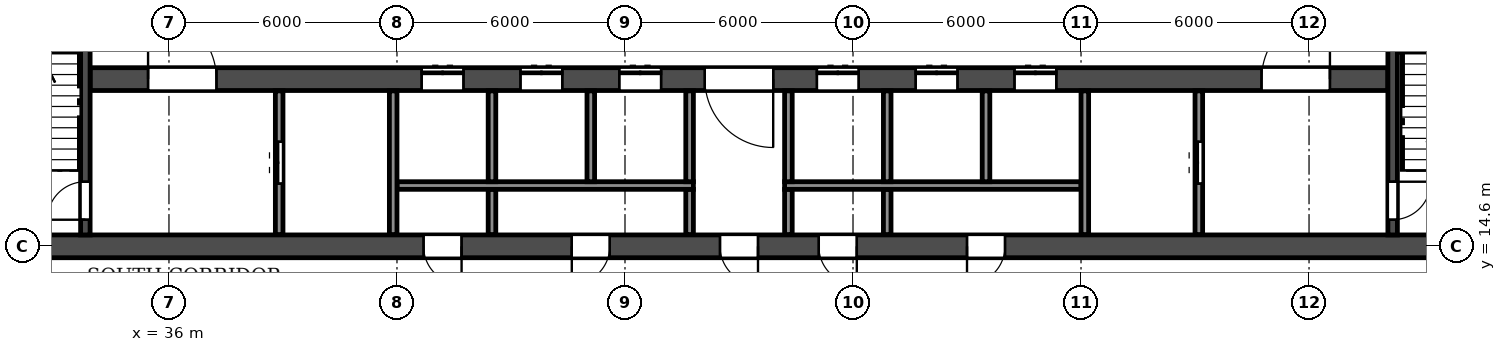
"""IFC4 building model, lengths in metres.
Left out: names, types, materials, properties, quantities, classifications, styles, units other than length and angle.
Written with IfcOpenShell. Run it as: python <this file> out.ifc"""

import sys

from ifc_helpers import new_model, si_unit, direction, frame, frame_2d, origin, place, context, subcontext, project, spatial, rectangle, extrude, element, fill, save


model = new_model("IFC4")
c1 = context("Model", 3, precision=1e-05, world=origin(), true_north=direction((0.0, 1.0)))
c2 = subcontext(c1, "Body", "Model", "MODEL_VIEW")
j1 = project(units=[si_unit("LENGTHUNIT", "METRE"), si_unit("PLANEANGLEUNIT", "RADIAN")], contexts=[c1])
p1 = place(None, origin())
s1 = spatial("IfcSite", under=j1, at=p1, CompositionType="ELEMENT")
p2 = place(p1, origin())
s2 = spatial("IfcBuilding", under=s1, at=p2, CompositionType="ELEMENT")
p3 = place(p2, frame((0.0, 0.0, 66.3)))
s3 = spatial("IfcBuildingStorey", under=s2, at=p3, CompositionType="ELEMENT", Elevation=66.3)
p4 = place(p3, frame((29.7, 14.6, 0.0), z_axis=(0.0, 0.0, 1.0), x_axis=(1.0, 0.0, 0.0)))
e1 = element("IfcWall", 1, at=p4, inside=s3, PredefinedType="SOLIDWALL", context=c2, shape_type="SweptSolid", body=[
    extrude(rectangle(XDim=42.6, YDim=0.6, at=frame_2d((21.3, 0.0))), origin(), (0.0, 0.0, 1.0), 6.36),
])
p5 = place(p4, frame((1.7, 0.0, 0.0)))
e2 = element("IfcOpeningElement", 2, at=p5, cuts=e1, PredefinedType="OPENING", context=c2, shape_type="SweptSolid", body=[
    extrude(rectangle(XDim=1.0, YDim=2.1, at=frame_2d((0.5, 1.05))), frame((0.0, 0.31, 0.0), z_axis=(0.0, -1.0, 0.0), x_axis=(1.0, 0.0, 0.0)), (0.0, 0.0, 1.0), 0.62),
])
p6 = place(p4, frame((13.0, 0.0, 0.0)))
e3 = element("IfcOpeningElement", 3, at=p6, cuts=e1, PredefinedType="OPENING", context=c2, shape_type="SweptSolid", body=[
    extrude(rectangle(XDim=1.0, YDim=2.1, at=frame_2d((0.5, 1.05))), frame((0.0, 0.31, 0.0), z_axis=(0.0, -1.0, 0.0), x_axis=(1.0, 0.0, 0.0)), (0.0, 0.0, 1.0), 0.62),
])
p7 = place(p4, frame((16.9, 0.0, 0.0)))
e4 = element("IfcOpeningElement", 4, at=p7, cuts=e1, PredefinedType="OPENING", context=c2, shape_type="SweptSolid", body=[
    extrude(rectangle(XDim=1.0, YDim=2.1, at=frame_2d((0.5, 1.05))), frame((0.0, 0.31, 0.0), z_axis=(0.0, -1.0, 0.0), x_axis=(1.0, 0.0, 0.0)), (0.0, 0.0, 1.0), 0.62),
])
p8 = place(p4, frame((20.8, 0.0, 0.0)))
e5 = element("IfcOpeningElement", 5, at=p8, cuts=e1, PredefinedType="OPENING", context=c2, shape_type="SweptSolid", body=[
    extrude(rectangle(XDim=1.0, YDim=2.1, at=frame_2d((0.5, 1.05))), frame((0.0, 0.31, 0.0), z_axis=(0.0, -1.0, 0.0), x_axis=(1.0, 0.0, 0.0)), (0.0, 0.0, 1.0), 0.62),
])
p9 = place(p4, frame((23.4, 0.0, 0.0)))
e6 = element("IfcOpeningElement", 6, at=p9, cuts=e1, PredefinedType="OPENING", context=c2, shape_type="SweptSolid", body=[
    extrude(rectangle(XDim=1.0, YDim=2.1, at=frame_2d((0.5, 1.05))), frame((0.0, 0.31, 0.0), z_axis=(0.0, -1.0, 0.0), x_axis=(1.0, 0.0, 0.0)), (0.0, 0.0, 1.0), 0.62),
])
p10 = place(p4, frame((27.3, 0.0, 0.0)))
e7 = element("IfcOpeningElement", 7, at=p10, cuts=e1, PredefinedType="OPENING", context=c2, shape_type="SweptSolid", body=[
    extrude(rectangle(XDim=1.0, YDim=2.1, at=frame_2d((0.5, 1.05))), frame((0.0, 0.31, 0.0), z_axis=(0.0, -1.0, 0.0), x_axis=(1.0, 0.0, 0.0)), (0.0, 0.0, 1.0), 0.62),
])
p11 = place(p4, frame((39.9, 0.0, 0.0)))
e8 = element("IfcOpeningElement", 8, at=p11, cuts=e1, PredefinedType="OPENING", context=c2, shape_type="SweptSolid", body=[
    extrude(rectangle(XDim=1.0, YDim=2.1, at=frame_2d((0.5, 1.05))), frame((0.0, 0.31, 0.0), z_axis=(0.0, -1.0, 0.0), x_axis=(1.0, 0.0, 0.0)), (0.0, 0.0, 1.0), 0.62),
])
p12 = place(p3, frame((33.925, 19.0, 0.0), z_axis=(0.0, 0.0, 1.0), x_axis=(1.0, 0.0, 0.0)))
e9 = element("IfcWall", 9, at=p12, inside=s3, PredefinedType="SOLIDWALL", context=c2, shape_type="SweptSolid", body=[
    extrude(rectangle(XDim=34.15, YDim=0.6, at=frame_2d((17.075, 0.0))), origin(), (0.0, 0.0, 1.0), 6.36),
])
p13 = place(p12, frame((16.175, 0.0, 0.0)))
e10 = element("IfcOpeningElement", 10, at=p13, cuts=e9, PredefinedType="OPENING", context=c2, shape_type="SweptSolid", body=[
    extrude(rectangle(XDim=1.8, YDim=2.1, at=frame_2d((0.9, 1.05))), frame((0.0, 0.31, 0.0), z_axis=(0.0, -1.0, 0.0), x_axis=(1.0, 0.0, 0.0)), (0.0, 0.0, 1.0), 0.62),
])
p14 = place(p12, frame((1.525, 0.0, 0.0)))
e11 = element("IfcOpeningElement", 11, at=p14, cuts=e9, PredefinedType="OPENING", context=c2, shape_type="SweptSolid", body=[
    extrude(rectangle(XDim=1.8, YDim=2.1, at=frame_2d((0.9, 1.05))), frame((0.0, 0.31, 0.0), z_axis=(0.0, -1.0, 0.0), x_axis=(1.0, 0.0, 0.0)), (0.0, 0.0, 1.0), 0.62),
])
p15 = place(p12, frame((8.725, 0.0, 0.0)))
e12 = element("IfcOpeningElement", 12, at=p15, cuts=e9, PredefinedType="OPENING", context=c2, shape_type="SweptSolid", body=[
    extrude(rectangle(XDim=1.1, YDim=2.1, at=frame_2d((0.55, 1.05))), frame((0.0, 0.31, 0.0), z_axis=(0.0, -1.0, 0.0), x_axis=(1.0, 0.0, 0.0)), (0.0, 0.0, 1.0), 0.62),
])
p16 = place(p12, frame((11.325, 0.0, 0.0)))
e13 = element("IfcOpeningElement", 13, at=p16, cuts=e9, PredefinedType="OPENING", context=c2, shape_type="SweptSolid", body=[
    extrude(rectangle(XDim=1.1, YDim=2.1, at=frame_2d((0.55, 1.05))), frame((0.0, 0.31, 0.0), z_axis=(0.0, -1.0, 0.0), x_axis=(1.0, 0.0, 0.0)), (0.0, 0.0, 1.0), 0.62),
])
p17 = place(p12, frame((13.925, 0.0, 0.0)))
e14 = element("IfcOpeningElement", 14, at=p17, cuts=e9, PredefinedType="OPENING", context=c2, shape_type="SweptSolid", body=[
    extrude(rectangle(XDim=1.1, YDim=2.1, at=frame_2d((0.55, 1.05))), frame((0.0, 0.31, 0.0), z_axis=(0.0, -1.0, 0.0), x_axis=(1.0, 0.0, 0.0)), (0.0, 0.0, 1.0), 0.62),
])
p18 = place(p12, frame((19.125, 0.0, 0.0)))
e15 = element("IfcOpeningElement", 15, at=p18, cuts=e9, PredefinedType="OPENING", context=c2, shape_type="SweptSolid", body=[
    extrude(rectangle(XDim=1.1, YDim=2.1, at=frame_2d((0.55, 1.05))), frame((0.0, 0.31, 0.0), z_axis=(0.0, -1.0, 0.0), x_axis=(1.0, 0.0, 0.0)), (0.0, 0.0, 1.0), 0.62),
])
p19 = place(p12, frame((21.725, 0.0, 0.0)))
e16 = element("IfcOpeningElement", 16, at=p19, cuts=e9, PredefinedType="OPENING", context=c2, shape_type="SweptSolid", body=[
    extrude(rectangle(XDim=1.1, YDim=2.1, at=frame_2d((0.55, 1.05))), frame((0.0, 0.31, 0.0), z_axis=(0.0, -1.0, 0.0), x_axis=(1.0, 0.0, 0.0)), (0.0, 0.0, 1.0), 0.62),
])
p20 = place(p12, frame((24.325, 0.0, 0.0)))
e17 = element("IfcOpeningElement", 17, at=p20, cuts=e9, PredefinedType="OPENING", context=c2, shape_type="SweptSolid", body=[
    extrude(rectangle(XDim=1.1, YDim=2.1, at=frame_2d((0.55, 1.05))), frame((0.0, 0.31, 0.0), z_axis=(0.0, -1.0, 0.0), x_axis=(1.0, 0.0, 0.0)), (0.0, 0.0, 1.0), 0.62),
])
p21 = place(p12, frame((30.825, 0.0, 0.0)))
e18 = element("IfcOpeningElement", 18, at=p21, cuts=e9, PredefinedType="OPENING", context=c2, shape_type="SweptSolid", body=[
    extrude(rectangle(XDim=1.8, YDim=2.1, at=frame_2d((0.9, 1.05))), frame((0.0, 0.31, 0.0), z_axis=(0.0, -1.0, 0.0), x_axis=(1.0, 0.0, 0.0)), (0.0, 0.0, 1.0), 0.62),
])
p22 = place(p3, frame((33.8, 14.9, 0.0), z_axis=(0.0, 0.0, 1.0), x_axis=(0.0, 1.0, 0.0)))
e19 = element("IfcWall", 19, at=p22, inside=s3, PredefinedType="SOLIDWALL", context=c2, shape_type="SweptSolid", body=[
    extrude(rectangle(XDim=7.575, YDim=0.25, at=frame_2d((3.788, 0.0))), origin(), (0.0, 0.0, 1.0), 6.36),
])
p23 = place(p22, frame((0.4, 0.0, 0.0)))
e20 = element("IfcOpeningElement", 20, at=p23, cuts=e19, PredefinedType="OPENING", context=c2, shape_type="SweptSolid", body=[
    extrude(rectangle(XDim=1.0, YDim=2.1, at=frame_2d((0.5, 1.05))), frame((0.0, 0.135, 0.0), z_axis=(0.0, -1.0, 0.0), x_axis=(1.0, 0.0, 0.0)), (0.0, 0.0, 1.0), 0.27),
])
p24 = place(p3, frame((68.2, 14.9, 0.0), z_axis=(0.0, 0.0, 1.0), x_axis=(0.0, 1.0, 0.0)))
e21 = element("IfcWall", 21, at=p24, inside=s3, PredefinedType="SOLIDWALL", context=c2, shape_type="SweptSolid", body=[
    extrude(rectangle(XDim=7.575, YDim=0.25, at=frame_2d((3.788, 0.0))), origin(), (0.0, 0.0, 1.0), 6.36),
])
p25 = place(p24, frame((0.4, 0.0, 0.0)))
e22 = element("IfcOpeningElement", 22, at=p25, cuts=e21, PredefinedType="OPENING", context=c2, shape_type="SweptSolid", body=[
    extrude(rectangle(XDim=1.0, YDim=2.1, at=frame_2d((0.5, 1.05))), frame((0.0, 0.135, 0.0), z_axis=(0.0, -1.0, 0.0), x_axis=(1.0, 0.0, 0.0)), (0.0, 0.0, 1.0), 0.27),
])
for number, where, z_axis, x_axis in (
    (23, (44.5, 14.91, 0.0), (0.0, 0.0, 1.0), (0.0, 1.0, 0.0)),
    (24, (49.7, 14.91, 0.0), (0.0, 0.0, 1.0), (0.0, 1.0, 0.0)),
    (25, (52.3, 14.91, 0.0), (0.0, 0.0, 1.0), (0.0, 1.0, 0.0)),
    (26, (54.9, 14.91, 0.0), (0.0, 0.0, 1.0), (0.0, 1.0, 0.0)),
):
    element("IfcWall", number, at=place(p3, frame(where, z_axis=z_axis, x_axis=x_axis)), inside=s3, PredefinedType="PARTITIONING", context=c2, shape_type="SweptSolid", body=[
        extrude(rectangle(XDim=1.19, YDim=0.2, at=frame_2d((0.595, 0.0))), origin(), (0.0, 0.0, 1.0), 6.36),
    ])
for number, where, z_axis, x_axis in (
    (27, (42.0, 16.2, 0.0), (0.0, 0.0, 1.0), (1.0, 0.0, 0.0)),
    (28, (52.2, 16.2, 0.0), (0.0, 0.0, 1.0), (1.0, 0.0, 0.0)),
):
    element("IfcWall", number, at=place(p3, frame(where, z_axis=z_axis, x_axis=x_axis)), inside=s3, PredefinedType="PARTITIONING", context=c2, shape_type="SweptSolid", body=[
        extrude(rectangle(XDim=7.8, YDim=0.2, at=frame_2d((3.9, 0.0))), origin(), (0.0, 0.0, 1.0), 6.36),
    ])
p26 = place(p3, frame((38.9, 14.91, 0.0), z_axis=(0.0, 0.0, 1.0), x_axis=(0.0, 1.0, 0.0)))
e29 = element("IfcWall", 29, at=p26, inside=s3, PredefinedType="PARTITIONING", context=c2, shape_type="SweptSolid", body=[
    extrude(rectangle(XDim=3.78, YDim=0.2, at=frame_2d((1.89, 0.0))), origin(), (0.0, 0.0, 1.0), 6.36),
])
p27 = place(p26, frame((1.34, 0.0, 0.0)))
e30 = element("IfcOpeningElement", 30, at=p27, cuts=e29, PredefinedType="OPENING", context=c2, shape_type="SweptSolid", body=[
    extrude(rectangle(XDim=1.1, YDim=2.1, at=frame_2d((0.55, 1.05))), frame((0.0, 0.11, 0.0), z_axis=(0.0, -1.0, 0.0), x_axis=(1.0, 0.0, 0.0)), (0.0, 0.0, 1.0), 0.22),
])
p28 = place(p3, frame((41.9, 14.91, 0.0), z_axis=(0.0, 0.0, 1.0), x_axis=(0.0, 1.0, 0.0)))
e31 = element("IfcWall", 31, at=p28, inside=s3, PredefinedType="PARTITIONING", context=c2, shape_type="SweptSolid", body=[
    extrude(rectangle(XDim=3.78, YDim=0.2, at=frame_2d((1.89, 0.0))), origin(), (0.0, 0.0, 1.0), 6.36),
])
for number, where, z_axis, x_axis in (
    (32, (44.5, 16.3, 0.0), (0.0, 0.0, 1.0), (0.0, 1.0, 0.0)),
    (33, (47.1, 16.3, 0.0), (0.0, 0.0, 1.0), (0.0, 1.0, 0.0)),
    (34, (49.7, 16.3, 0.0), (0.0, 0.0, 1.0), (0.0, 1.0, 0.0)),
    (35, (52.3, 16.3, 0.0), (0.0, 0.0, 1.0), (0.0, 1.0, 0.0)),
    (36, (54.9, 16.3, 0.0), (0.0, 0.0, 1.0), (0.0, 1.0, 0.0)),
    (37, (57.5, 16.3, 0.0), (0.0, 0.0, 1.0), (0.0, 1.0, 0.0)),
):
    element("IfcWall", number, at=place(p3, frame(where, z_axis=z_axis, x_axis=x_axis)), inside=s3, PredefinedType="PARTITIONING", context=c2, shape_type="SweptSolid", body=[
        extrude(rectangle(XDim=2.39, YDim=0.2, at=frame_2d((1.195, 0.0))), origin(), (0.0, 0.0, 1.0), 6.36),
    ])
p29 = place(p3, frame((60.1, 14.91, 0.0), z_axis=(0.0, 0.0, 1.0), x_axis=(0.0, 1.0, 0.0)))
e38 = element("IfcWall", 38, at=p29, inside=s3, PredefinedType="PARTITIONING", context=c2, shape_type="SweptSolid", body=[
    extrude(rectangle(XDim=3.78, YDim=0.2, at=frame_2d((1.89, 0.0))), origin(), (0.0, 0.0, 1.0), 6.36),
])
p30 = place(p3, frame((63.1, 14.91, 0.0), z_axis=(0.0, 0.0, 1.0), x_axis=(0.0, 1.0, 0.0)))
e39 = element("IfcWall", 39, at=p30, inside=s3, PredefinedType="PARTITIONING", context=c2, shape_type="SweptSolid", body=[
    extrude(rectangle(XDim=3.78, YDim=0.2, at=frame_2d((1.89, 0.0))), origin(), (0.0, 0.0, 1.0), 6.36),
])
p31 = place(p30, frame((1.34, 0.0, 0.0)))
e40 = element("IfcOpeningElement", 40, at=p31, cuts=e39, PredefinedType="OPENING", context=c2, shape_type="SweptSolid", body=[
    extrude(rectangle(XDim=1.1, YDim=2.1, at=frame_2d((0.55, 1.05))), frame((0.0, 0.11, 0.0), z_axis=(0.0, -1.0, 0.0), x_axis=(1.0, 0.0, 0.0)), (0.0, 0.0, 1.0), 0.22),
])
p32 = place(p6, frame((1.0, 0.0, 0.0), z_axis=(0.0, 0.0, 1.0), x_axis=(-1.0, 0.0, 0.0)))
e41 = element("IfcDoor", 41, at=p32, inside=s3, OperationType="SINGLE_SWING_LEFT", PredefinedType="DOOR", context=c2, shape_type="SweptSolid", body=[
    extrude(rectangle(XDim=1.0, YDim=2.1, at=frame_2d((0.5, 1.05))), frame((0.0, 0.025, 0.0), z_axis=(0.0, -1.0, 0.0), x_axis=(1.0, 0.0, 0.0)), (0.0, 0.0, 1.0), 0.05),
])
fill(e3, e41)
p33 = place(p7, frame((1.0, 0.0, 0.0), z_axis=(0.0, 0.0, 1.0), x_axis=(-1.0, 0.0, 0.0)))
e42 = element("IfcDoor", 42, at=p33, inside=s3, OperationType="SINGLE_SWING_RIGHT", PredefinedType="DOOR", context=c2, shape_type="SweptSolid", body=[
    extrude(rectangle(XDim=1.0, YDim=2.1, at=frame_2d((0.5, 1.05))), frame((0.0, 0.025, 0.0), z_axis=(0.0, -1.0, 0.0), x_axis=(1.0, 0.0, 0.0)), (0.0, 0.0, 1.0), 0.05),
])
fill(e4, e42)
p34 = place(p8, frame((1.0, 0.0, 0.0), z_axis=(0.0, 0.0, 1.0), x_axis=(-1.0, 0.0, 0.0)))
e43 = element("IfcDoor", 43, at=p34, inside=s3, OperationType="SINGLE_SWING_LEFT", PredefinedType="DOOR", context=c2, shape_type="SweptSolid", body=[
    extrude(rectangle(XDim=1.0, YDim=2.1, at=frame_2d((0.5, 1.05))), frame((0.0, 0.025, 0.0), z_axis=(0.0, -1.0, 0.0), x_axis=(1.0, 0.0, 0.0)), (0.0, 0.0, 1.0), 0.05),
])
fill(e5, e43)
p35 = place(p9, frame((1.0, 0.0, 0.0), z_axis=(0.0, 0.0, 1.0), x_axis=(-1.0, 0.0, 0.0)))
e44 = element("IfcDoor", 44, at=p35, inside=s3, OperationType="SINGLE_SWING_LEFT", PredefinedType="DOOR", context=c2, shape_type="SweptSolid", body=[
    extrude(rectangle(XDim=1.0, YDim=2.1, at=frame_2d((0.5, 1.05))), frame((0.0, 0.025, 0.0), z_axis=(0.0, -1.0, 0.0), x_axis=(1.0, 0.0, 0.0)), (0.0, 0.0, 1.0), 0.05),
])
fill(e6, e44)
p36 = place(p10, frame((1.0, 0.0, 0.0), z_axis=(0.0, 0.0, 1.0), x_axis=(-1.0, 0.0, 0.0)))
e45 = element("IfcDoor", 45, at=p36, inside=s3, OperationType="SINGLE_SWING_RIGHT", PredefinedType="DOOR", context=c2, shape_type="SweptSolid", body=[
    extrude(rectangle(XDim=1.0, YDim=2.1, at=frame_2d((0.5, 1.05))), frame((0.0, 0.025, 0.0), z_axis=(0.0, -1.0, 0.0), x_axis=(1.0, 0.0, 0.0)), (0.0, 0.0, 1.0), 0.05),
])
fill(e7, e45)
p37 = place(p31, origin())
e46 = element("IfcDoor", 46, at=p37, inside=s3, OperationType="DOUBLE_DOOR_SLIDING", PredefinedType="DOOR", context=c2, shape_type="SweptSolid", body=[
    extrude(rectangle(XDim=1.1, YDim=2.1, at=frame_2d((0.55, 1.05))), frame((0.0, 0.025, 0.0), z_axis=(0.0, -1.0, 0.0), x_axis=(1.0, 0.0, 0.0)), (0.0, 0.0, 1.0), 0.05),
])
fill(e40, e46)
p38 = place(p25, frame((1.0, 0.0, 0.0), z_axis=(0.0, 0.0, 1.0), x_axis=(-1.0, 0.0, 0.0)))
e47 = element("IfcDoor", 47, at=p38, inside=s3, OperationType="SINGLE_SWING_LEFT", PredefinedType="DOOR", context=c2, shape_type="SweptSolid", body=[
    extrude(rectangle(XDim=1.0, YDim=2.1, at=frame_2d((0.5, 1.05))), frame((0.0, 0.025, 0.0), z_axis=(0.0, -1.0, 0.0), x_axis=(1.0, 0.0, 0.0)), (0.0, 0.0, 1.0), 0.05),
])
fill(e22, e47)
p39 = place(p23, origin())
e48 = element("IfcDoor", 48, at=p39, inside=s3, OperationType="SINGLE_SWING_LEFT", PredefinedType="DOOR", context=c2, shape_type="SweptSolid", body=[
    extrude(rectangle(XDim=1.0, YDim=2.1, at=frame_2d((0.5, 1.05))), frame((0.0, 0.025, 0.0), z_axis=(0.0, -1.0, 0.0), x_axis=(1.0, 0.0, 0.0)), (0.0, 0.0, 1.0), 0.05),
])
fill(e20, e48)
p40 = place(p27, origin())
e49 = element("IfcDoor", 49, at=p40, inside=s3, OperationType="DOUBLE_DOOR_SLIDING", PredefinedType="DOOR", context=c2, shape_type="SweptSolid", body=[
    extrude(rectangle(XDim=1.1, YDim=2.1, at=frame_2d((0.55, 1.05))), frame((0.0, 0.025, 0.0), z_axis=(0.0, -1.0, 0.0), x_axis=(1.0, 0.0, 0.0)), (0.0, 0.0, 1.0), 0.05),
])
fill(e30, e49)
p41 = place(p13, frame((1.8, 0.0, 0.0), z_axis=(0.0, 0.0, 1.0), x_axis=(-1.0, 0.0, 0.0)))
e50 = element("IfcDoor", 50, at=p41, inside=s3, OperationType="DOUBLE_DOOR_SINGLE_SWING", PredefinedType="DOOR", context=c2, shape_type="SweptSolid", body=[
    extrude(rectangle(XDim=1.8, YDim=2.1, at=frame_2d((0.9, 1.05))), frame((0.0, 0.025, 0.0), z_axis=(0.0, -1.0, 0.0), x_axis=(1.0, 0.0, 0.0)), (0.0, 0.0, 1.0), 0.05),
])
fill(e10, e50)
p42 = place(p14, origin())
e51 = element("IfcDoor", 51, at=p42, inside=s3, OperationType="DOUBLE_DOOR_SINGLE_SWING", PredefinedType="DOOR", context=c2, shape_type="SweptSolid", body=[
    extrude(rectangle(XDim=1.8, YDim=2.1, at=frame_2d((0.9, 1.05))), frame((0.0, 0.025, 0.0), z_axis=(0.0, -1.0, 0.0), x_axis=(1.0, 0.0, 0.0)), (0.0, 0.0, 1.0), 0.05),
])
fill(e11, e51)
p43 = place(p15, origin())
e52 = element("IfcDoor", 52, at=p43, inside=s3, OperationType="DOUBLE_DOOR_SLIDING", PredefinedType="DOOR", context=c2, shape_type="SweptSolid", body=[
    extrude(rectangle(XDim=1.1, YDim=2.1, at=frame_2d((0.55, 1.05))), frame((0.0, 0.025, 0.0), z_axis=(0.0, -1.0, 0.0), x_axis=(1.0, 0.0, 0.0)), (0.0, 0.0, 1.0), 0.05),
])
fill(e12, e52)
p44 = place(p16, origin())
e53 = element("IfcDoor", 53, at=p44, inside=s3, OperationType="DOUBLE_DOOR_SLIDING", PredefinedType="DOOR", context=c2, shape_type="SweptSolid", body=[
    extrude(rectangle(XDim=1.1, YDim=2.1, at=frame_2d((0.55, 1.05))), frame((0.0, 0.025, 0.0), z_axis=(0.0, -1.0, 0.0), x_axis=(1.0, 0.0, 0.0)), (0.0, 0.0, 1.0), 0.05),
])
fill(e13, e53)
p45 = place(p17, origin())
e54 = element("IfcDoor", 54, at=p45, inside=s3, OperationType="DOUBLE_DOOR_SLIDING", PredefinedType="DOOR", context=c2, shape_type="SweptSolid", body=[
    extrude(rectangle(XDim=1.1, YDim=2.1, at=frame_2d((0.55, 1.05))), frame((0.0, 0.025, 0.0), z_axis=(0.0, -1.0, 0.0), x_axis=(1.0, 0.0, 0.0)), (0.0, 0.0, 1.0), 0.05),
])
fill(e14, e54)
p46 = place(p18, origin())
e55 = element("IfcDoor", 55, at=p46, inside=s3, OperationType="DOUBLE_DOOR_SLIDING", PredefinedType="DOOR", context=c2, shape_type="SweptSolid", body=[
    extrude(rectangle(XDim=1.1, YDim=2.1, at=frame_2d((0.55, 1.05))), frame((0.0, 0.025, 0.0), z_axis=(0.0, -1.0, 0.0), x_axis=(1.0, 0.0, 0.0)), (0.0, 0.0, 1.0), 0.05),
])
fill(e15, e55)
p47 = place(p19, origin())
e56 = element("IfcDoor", 56, at=p47, inside=s3, OperationType="DOUBLE_DOOR_SLIDING", PredefinedType="DOOR", context=c2, shape_type="SweptSolid", body=[
    extrude(rectangle(XDim=1.1, YDim=2.1, at=frame_2d((0.55, 1.05))), frame((0.0, 0.025, 0.0), z_axis=(0.0, -1.0, 0.0), x_axis=(1.0, 0.0, 0.0)), (0.0, 0.0, 1.0), 0.05),
])
fill(e16, e56)
p48 = place(p20, origin())
e57 = element("IfcDoor", 57, at=p48, inside=s3, OperationType="DOUBLE_DOOR_SLIDING", PredefinedType="DOOR", context=c2, shape_type="SweptSolid", body=[
    extrude(rectangle(XDim=1.1, YDim=2.1, at=frame_2d((0.55, 1.05))), frame((0.0, 0.025, 0.0), z_axis=(0.0, -1.0, 0.0), x_axis=(1.0, 0.0, 0.0)), (0.0, 0.0, 1.0), 0.05),
])
fill(e17, e57)
p49 = place(p21, origin())
e58 = element("IfcDoor", 58, at=p49, inside=s3, OperationType="DOUBLE_DOOR_SINGLE_SWING", PredefinedType="DOOR", context=c2, shape_type="SweptSolid", body=[
    extrude(rectangle(XDim=1.8, YDim=2.1, at=frame_2d((0.9, 1.05))), frame((0.0, 0.025, 0.0), z_axis=(0.0, -1.0, 0.0), x_axis=(1.0, 0.0, 0.0)), (0.0, 0.0, 1.0), 0.05),
])
fill(e18, e58)
save(model, sys.argv[1])
